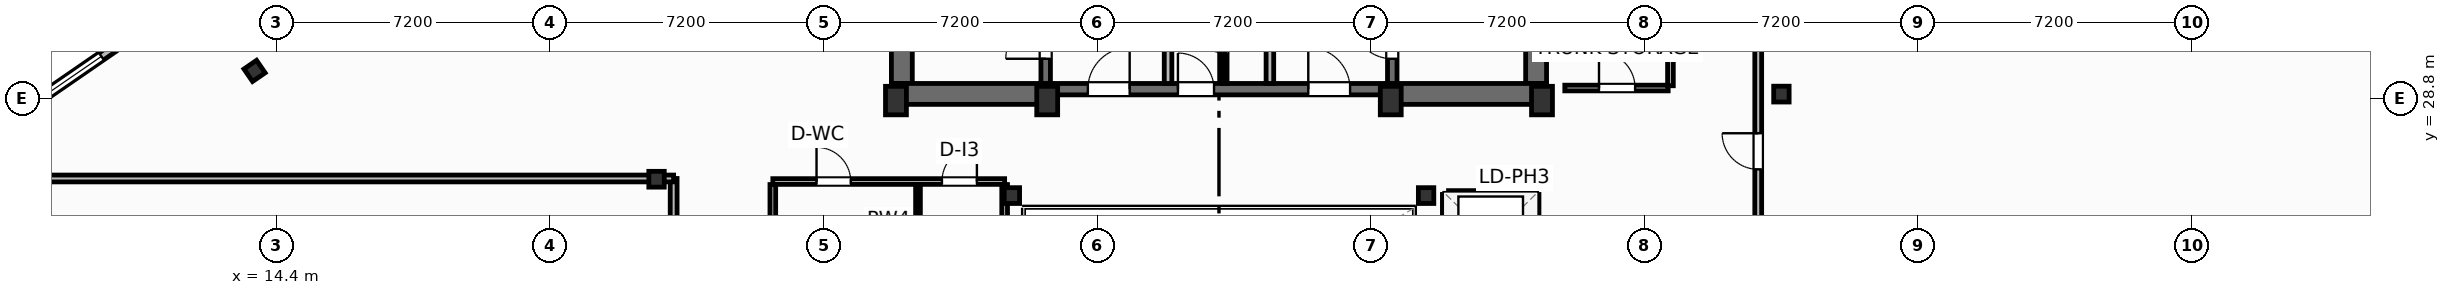
"""IFC4 building model, lengths in metres.
Left out: names, types, materials, properties, quantities, classifications, styles, units other than length and angle.
Written with IfcOpenShell. Run it as: python <this file> out.ifc"""

import sys

from ifc_helpers import new_model, si_unit, direction, frame, frame_2d, origin, origin_2d, place, context, subcontext, project, spatial, rectangle, i_section, extrude, element, fill, save


model = new_model("IFC4")
c1 = context("Model", 3, precision=1e-05, world=origin(), true_north=direction((0.0, 1.0)))
c2 = subcontext(c1, "Body", "Model", "MODEL_VIEW")
j1 = project(units=[si_unit("LENGTHUNIT", "METRE"), si_unit("PLANEANGLEUNIT", "RADIAN")], contexts=[c1])
p1 = place(None, origin())
s1 = spatial("IfcSite", under=j1, at=p1, CompositionType="ELEMENT")
p2 = place(p1, origin())
s2 = spatial("IfcBuilding", under=s1, at=p2, CompositionType="ELEMENT")
p3 = place(p2, frame((0.0, 0.0, 280.4)))
s3 = spatial("IfcBuildingStorey", under=s2, at=p3, CompositionType="ELEMENT", Elevation=280.4)
for number, where, z_axis, x_axis in (
    (1, (30.7, 28.75, 0.0), (0.0, 0.0, 1.0), (1.0, 0.0, 0.0)),
    (2, (34.68, 28.75, 0.0), (0.0, 0.0, 1.0), (1.0, 0.0, 0.0)),
    (3, (43.72, 28.75, 0.0), (0.0, 0.0, 1.0), (1.0, 0.0, 0.0)),
    (4, (47.7, 28.75, 0.0), (0.0, 0.0, 1.0), (1.0, 0.0, 0.0)),
):
    element("IfcColumn", number, at=place(p3, frame(where, z_axis=z_axis, x_axis=x_axis)), inside=s3, PredefinedType="COLUMN", context=c2, shape_type="SweptSolid", body=[
        extrude(rectangle(XDim=0.55, YDim=0.75, at=origin_2d()), origin(), (0.0, 0.0, 1.0), 3.7),
    ])
for number, where, z_axis, x_axis in (
    (5, (33.75, 26.25, 0.0), (0.0, 0.0, 1.0), (1.0, 0.0, 0.0)),
    (6, (44.65, 26.25, 0.0), (0.0, 0.0, 1.0), (1.0, 0.0, 0.0)),
    (7, (24.4, 26.68, 0.0), (0.0, 0.0, 1.0), (1.0, 0.0, 0.0)),
    (8, (54.0, 28.92, 0.0), (0.0, 0.0, 1.0), (1.0, 0.0, 0.0)),
):
    element("IfcColumn", number, at=place(p3, frame(where, z_axis=z_axis, x_axis=x_axis)), inside=s3, PredefinedType="COLUMN", context=c2, shape_type="SweptSolid", body=[
        extrude(i_section(OverallWidth=0.406, OverallDepth=0.416, WebThickness=0.03, FlangeThickness=0.048, FilletRadius=0.025, at=origin_2d()), origin(), (0.0, 0.0, 1.0), 3.7),
    ])
for number, where, z_axis, x_axis in (
    (9, (30.855, 29.2, 0.0), (0.0, 0.0, 1.0), (0.0, 1.0, 0.0)),
    (10, (47.545, 29.2, 0.0), (0.0, 0.0, 1.0), (0.0, 1.0, 0.0)),
):
    element("IfcWall", number, at=place(p3, frame(where, z_axis=z_axis, x_axis=x_axis)), inside=s3, PredefinedType="SHEAR", context=c2, shape_type="SweptSolid", body=[
        extrude(rectangle(XDim=9.22, YDim=0.55, at=frame_2d((4.61, 0.0))), origin(), (0.0, 0.0, 1.0), 3.45),
    ])
for number, where, z_axis, x_axis in (
    (11, (30.58, 28.925, 0.0), (0.0, 0.0, 1.0), (1.0, 0.0, 0.0)),
    (12, (43.6, 28.925, 0.0), (0.0, 0.0, 1.0), (1.0, 0.0, 0.0)),
):
    element("IfcWall", number, at=place(p3, frame(where, z_axis=z_axis, x_axis=x_axis)), inside=s3, PredefinedType="SHEAR", context=c2, shape_type="SweptSolid", body=[
        extrude(rectangle(XDim=4.22, YDim=0.55, at=frame_2d((2.11, 0.0))), origin(), (0.0, 0.0, 1.0), 3.45),
    ])
p4 = place(p3, frame((34.8, 29.05, 0.0), z_axis=(0.0, 0.0, 1.0), x_axis=(1.0, 0.0, 0.0)))
e13 = element("IfcWall", 13, at=p4, inside=s3, PredefinedType="SHEAR", context=c2, shape_type="SweptSolid", body=[
    extrude(rectangle(XDim=8.8, YDim=0.3, at=frame_2d((4.4, 0.0))), origin(), (0.0, 0.0, 1.0), 3.45),
])
p5 = place(p4, frame((0.95, 0.0, 0.0)))
e14 = element("IfcOpeningElement", 14, at=p5, cuts=e13, PredefinedType="OPENING", context=c2, shape_type="SweptSolid", body=[
    extrude(rectangle(XDim=1.1, YDim=2.15, at=frame_2d((0.55, 1.075))), frame((0.0, 0.16, 0.0), z_axis=(0.0, -1.0, 0.0), x_axis=(1.0, 0.0, 0.0)), (0.0, 0.0, 1.0), 0.32),
])
p6 = place(p4, frame((6.75, 0.0, 0.0)))
e15 = element("IfcOpeningElement", 15, at=p6, cuts=e13, PredefinedType="OPENING", context=c2, shape_type="SweptSolid", body=[
    extrude(rectangle(XDim=1.1, YDim=2.15, at=frame_2d((0.55, 1.075))), frame((0.0, 0.16, 0.0), z_axis=(0.0, -1.0, 0.0), x_axis=(1.0, 0.0, 0.0)), (0.0, 0.0, 1.0), 0.32),
])
p7 = place(p4, frame((3.32, 0.0, 0.0)))
e16 = element("IfcOpeningElement", 16, at=p7, cuts=e13, PredefinedType="OPENING", context=c2, shape_type="SweptSolid", body=[
    extrude(rectangle(XDim=0.95, YDim=2.15, at=frame_2d((0.475, 1.075))), frame((0.0, 0.16, 0.0), z_axis=(0.0, -1.0, 0.0), x_axis=(1.0, 0.0, 0.0)), (0.0, 0.0, 1.0), 0.32),
])
p8 = place(p3, frame((34.64, 29.2, 0.0), z_axis=(0.0, 0.0, 1.0), x_axis=(0.0, 1.0, 0.0)))
e17 = element("IfcWall", 17, at=p8, inside=s3, PredefinedType="SHEAR", context=c2, shape_type="SweptSolid", body=[
    extrude(rectangle(XDim=9.22, YDim=0.25, at=frame_2d((4.61, 0.0))), origin(), (0.0, 0.0, 1.0), 3.45),
])
p9 = place(p8, frame((0.65, 0.0, 0.0)))
e18 = element("IfcOpeningElement", 18, at=p9, cuts=e17, PredefinedType="OPENING", context=c2, shape_type="SweptSolid", body=[
    extrude(rectangle(XDim=1.05, YDim=2.15, at=frame_2d((0.525, 1.075))), frame((0.0, 0.135, 0.0), z_axis=(0.0, -1.0, 0.0), x_axis=(1.0, 0.0, 0.0)), (0.0, 0.0, 1.0), 0.27),
])
p10 = place(p3, frame((43.76, 29.2, 0.0), z_axis=(0.0, 0.0, 1.0), x_axis=(0.0, 1.0, 0.0)))
e19 = element("IfcWall", 19, at=p10, inside=s3, PredefinedType="SHEAR", context=c2, shape_type="SweptSolid", body=[
    extrude(rectangle(XDim=9.22, YDim=0.25, at=frame_2d((4.61, 0.0))), origin(), (0.0, 0.0, 1.0), 3.45),
])
p11 = place(p10, frame((0.65, 0.0, 0.0)))
e20 = element("IfcOpeningElement", 20, at=p11, cuts=e19, PredefinedType="OPENING", context=c2, shape_type="SweptSolid", body=[
    extrude(rectangle(XDim=1.05, YDim=2.15, at=frame_2d((0.525, 1.075))), frame((0.0, 0.135, 0.0), z_axis=(0.0, -1.0, 0.0), x_axis=(1.0, 0.0, 0.0)), (0.0, 0.0, 1.0), 0.27),
])
p12 = place(p3, frame((13.822, 29.53, 0.0), z_axis=(0.0, 0.0, 1.0), x_axis=(0.823532597628, 0.567268949127, 0.0)))
e21 = element("IfcColumn", 21, at=p12, inside=s3, PredefinedType="COLUMN", context=c2, shape_type="SweptSolid", body=[
    extrude(i_section(OverallWidth=0.401, OverallDepth=0.399, WebThickness=0.025, FlangeThickness=0.04, FilletRadius=0.022, at=origin_2d()), origin(), (0.0, 0.0, 1.0), 3.7),
])
p13 = place(p3, frame((13.408, 32.402, 0.0), z_axis=(0.0, 0.0, 1.0), x_axis=(-0.823527634633, -0.567276154087, 0.0)))
e22 = element("IfcWall", 22, at=p13, inside=s3, PredefinedType="SOLIDWALL", context=c2, shape_type="SweptSolid", body=[
    extrude(rectangle(XDim=10.88, YDim=0.22, at=frame_2d((5.44, 0.0))), origin(), (0.0, 0.0, 1.0), 2.73),
])
p14 = place(p13, frame((4.39, 0.0, 0.8)))
e23 = element("IfcOpeningElement", 23, at=p14, cuts=e22, PredefinedType="OPENING", context=c2, shape_type="SweptSolid", body=[
    extrude(rectangle(XDim=2.1, YDim=1.75, at=frame_2d((1.05, 0.875))), frame((0.0, 0.12, 0.0), z_axis=(0.0, -1.0, 0.0), x_axis=(1.0, 0.0, 0.0)), (0.0, 0.0, 1.0), 0.24),
])
p15 = place(p3, frame((24.85, 19.2, 0.0), z_axis=(0.0, 0.0, 1.0), x_axis=(0.0, 1.0, 0.0)))
e24 = element("IfcWall", 24, at=p15, inside=s3, PredefinedType="PARTITIONING", context=c2, shape_type="SweptSolid", body=[
    extrude(rectangle(XDim=7.5, YDim=0.18, at=frame_2d((3.75, 0.0))), origin(), (0.0, 0.0, 1.0), 3.45),
])
p16 = place(p15, frame((3.275, 0.0, 0.0)))
e25 = element("IfcOpeningElement", 25, at=p16, cuts=e24, PredefinedType="OPENING", context=c2, shape_type="SweptSolid", body=[
    extrude(rectangle(XDim=0.95, YDim=2.05, at=frame_2d((0.475, 1.025))), frame((0.0, 0.1, 0.0), z_axis=(0.0, -1.0, 0.0), x_axis=(1.0, 0.0, 0.0)), (0.0, 0.0, 1.0), 0.2),
])
p17 = place(p3, frame((5.165, 26.7, 0.0), z_axis=(0.0, 0.0, 1.0), x_axis=(1.0, 0.0, 0.0)))
e26 = element("IfcWall", 26, at=p17, inside=s3, PredefinedType="PARTITIONING", context=c2, shape_type="SweptSolid", body=[
    extrude(rectangle(XDim=19.685, YDim=0.18, at=frame_2d((9.843, 0.0))), origin(), (0.0, 0.0, 1.0), 2.662),
])
p18 = place(p3, frame((53.39, 19.24, 0.0), z_axis=(0.0, 0.0, 1.0), x_axis=(0.0, 1.0, 0.0)))
e27 = element("IfcWall", 27, at=p18, inside=s3, PredefinedType="PARTITIONING", context=c2, shape_type="SweptSolid", body=[
    extrude(rectangle(XDim=20.06, YDim=0.18, at=frame_2d((10.03, 0.0))), origin(), (0.0, 0.0, 1.0), 3.45),
])
p19 = place(p18, frame((7.7, 0.0, 0.0)))
e28 = element("IfcOpeningElement", 28, at=p19, cuts=e27, PredefinedType="OPENING", context=c2, shape_type="SweptSolid", body=[
    extrude(rectangle(XDim=0.95, YDim=2.05, at=frame_2d((0.475, 1.025))), frame((0.0, 0.1, 0.0), z_axis=(0.0, -1.0, 0.0), x_axis=(1.0, 0.0, 0.0)), (0.0, 0.0, 1.0), 0.2),
])
for number, where, z_axis, x_axis in (
    (29, (37.86, 29.2, 0.0), (0.0, 0.0, 1.0), (0.0, 1.0, 0.0)),
    (30, (40.54, 29.2, 0.0), (0.0, 0.0, 1.0), (0.0, 1.0, 0.0)),
):
    element("IfcWall", number, at=place(p3, frame(where, z_axis=z_axis, x_axis=x_axis)), inside=s3, PredefinedType="PARTITIONING", context=c2, shape_type="SweptSolid", body=[
        extrude(rectangle(XDim=5.18, YDim=0.2, at=frame_2d((2.59, 0.0))), origin(), (0.0, 0.0, 1.0), 3.45),
    ])
p20 = place(p3, frame((39.35, 29.2, 0.0), z_axis=(0.0, 0.0, 1.0), x_axis=(0.0, 1.0, 0.0)))
e31 = element("IfcWall", 31, at=p20, inside=s3, PredefinedType="PARTITIONING", context=c2, shape_type="SweptSolid", body=[
    extrude(rectangle(XDim=5.22, YDim=0.125, at=frame_2d((2.61, 0.0))), origin(), (0.0, 0.0, 1.0), 3.45),
])
p21 = place(p20, frame((0.8, 0.0, 0.0)))
e32 = element("IfcOpeningElement", 32, at=p21, cuts=e31, PredefinedType="OPENING", context=c2, shape_type="SweptSolid", body=[
    extrude(rectangle(XDim=0.85, YDim=2.05, at=frame_2d((0.425, 1.025))), frame((0.0, 0.073, 0.0), z_axis=(0.0, -1.0, 0.0), x_axis=(1.0, 0.0, 0.0)), (0.0, 0.0, 1.0), 0.145),
])
p22 = place(p20, frame((3.4, 0.0, 0.0)))
e33 = element("IfcOpeningElement", 33, at=p22, cuts=e31, PredefinedType="OPENING", context=c2, shape_type="SweptSolid", body=[
    extrude(rectangle(XDim=0.85, YDim=2.05, at=frame_2d((0.425, 1.025))), frame((0.0, 0.073, 0.0), z_axis=(0.0, -1.0, 0.0), x_axis=(1.0, 0.0, 0.0)), (0.0, 0.0, 1.0), 0.145),
])
p23 = place(p3, frame((27.46, 26.62, 0.0), z_axis=(0.0, 0.0, 1.0), x_axis=(1.0, 0.0, 0.0)))
e34 = element("IfcWall", 34, at=p23, inside=s3, PredefinedType="PARTITIONING", context=c2, shape_type="SweptSolid", body=[
    extrude(rectangle(XDim=6.1, YDim=0.15, at=frame_2d((3.05, 0.0))), origin(), (0.0, 0.0, 1.0), 2.662),
])
p24 = place(p23, frame((1.15, 0.0, 0.0)))
e35 = element("IfcOpeningElement", 35, at=p24, cuts=e34, PredefinedType="OPENING", context=c2, shape_type="SweptSolid", body=[
    extrude(rectangle(XDim=0.9, YDim=2.05, at=frame_2d((0.45, 1.025))), frame((0.0, 0.085, 0.0), z_axis=(0.0, -1.0, 0.0), x_axis=(1.0, 0.0, 0.0)), (0.0, 0.0, 1.0), 0.17),
])
p25 = place(p23, frame((4.45, 0.0, 0.0)))
e36 = element("IfcOpeningElement", 36, at=p25, cuts=e34, PredefinedType="OPENING", context=c2, shape_type="SweptSolid", body=[
    extrude(rectangle(XDim=0.92, YDim=2.05, at=frame_2d((0.46, 1.025))), frame((0.0, 0.085, 0.0), z_axis=(0.0, -1.0, 0.0), x_axis=(1.0, 0.0, 0.0)), (0.0, 0.0, 1.0), 0.17),
])
p26 = place(p3, frame((31.28, 19.38, 0.0), z_axis=(0.0, 0.0, 1.0), x_axis=(0.0, 1.0, 0.0)))
e37 = element("IfcWall", 37, at=p26, inside=s3, PredefinedType="PARTITIONING", context=c2, shape_type="SweptSolid", body=[
    extrude(rectangle(XDim=7.16, YDim=0.125, at=frame_2d((3.58, 0.0))), origin(), (0.0, 0.0, 1.0), 3.45),
])
p27 = place(p3, frame((27.46, 19.38, 0.0), z_axis=(0.0, 0.0, 1.0), x_axis=(0.0, 1.0, 0.0)))
e38 = element("IfcWall", 38, at=p27, inside=s3, PredefinedType="PARTITIONING", context=c2, shape_type="SweptSolid", body=[
    extrude(rectangle(XDim=7.16, YDim=0.15, at=frame_2d((3.58, 0.0))), origin(), (0.0, 0.0, 1.0), 3.45),
])
p28 = place(p27, frame((1.4, 0.0, 0.0)))
e39 = element("IfcOpeningElement", 39, at=p28, cuts=e38, PredefinedType="OPENING", context=c2, shape_type="SweptSolid", body=[
    extrude(rectangle(XDim=0.95, YDim=2.05, at=frame_2d((0.475, 1.025))), frame((0.0, 0.085, 0.0), z_axis=(0.0, -1.0, 0.0), x_axis=(1.0, 0.0, 0.0)), (0.0, 0.0, 1.0), 0.17),
])
p29 = place(p3, frame((33.56, 19.38, 0.0), z_axis=(0.0, 0.0, 1.0), x_axis=(0.0, 1.0, 0.0)))
e40 = element("IfcWall", 40, at=p29, inside=s3, PredefinedType="PARTITIONING", context=c2, shape_type="SweptSolid", body=[
    extrude(rectangle(XDim=7.16, YDim=0.15, at=frame_2d((3.58, 0.0))), origin(), (0.0, 0.0, 1.0), 2.824),
])
p30 = place(p3, frame((48.3, 29.08, 0.0), z_axis=(0.0, 0.0, 1.0), x_axis=(1.0, 0.0, 0.0)))
e41 = element("IfcWall", 41, at=p30, inside=s3, PredefinedType="PARTITIONING", context=c2, shape_type="SweptSolid", body=[
    extrude(rectangle(XDim=2.72, YDim=0.15, at=frame_2d((1.36, 0.0))), origin(), (0.0, 0.0, 1.0), 2.662),
])
p31 = place(p30, frame((0.9, 0.0, 0.0)))
e42 = element("IfcOpeningElement", 42, at=p31, cuts=e41, PredefinedType="OPENING", context=c2, shape_type="SweptSolid", body=[
    extrude(rectangle(XDim=0.95, YDim=2.05, at=frame_2d((0.475, 1.025))), frame((0.0, 0.085, 0.0), z_axis=(0.0, -1.0, 0.0), x_axis=(1.0, 0.0, 0.0)), (0.0, 0.0, 1.0), 0.17),
])
p32 = place(p3, frame((51.08, 29.14, 0.0), z_axis=(0.0, 0.0, 1.0), x_axis=(0.0, 1.0, 0.0)))
e43 = element("IfcWall", 43, at=p32, inside=s3, PredefinedType="PARTITIONING", context=c2, shape_type="SweptSolid", body=[
    extrude(rectangle(XDim=4.69, YDim=0.15, at=frame_2d((2.345, 0.0))), origin(), (0.0, 0.0, 1.0), 3.45),
])
p33 = place(p3, frame((45.24, 26.28, 0.0), z_axis=(0.0, 0.0, 1.0), x_axis=(1.0, 0.0, 0.0)))
e44 = element("IfcWall", 44, at=p33, inside=s3, PredefinedType="PARTITIONING", context=c2, shape_type="SweptSolid", body=[
    extrude(rectangle(XDim=2.22, YDim=0.2, at=frame_2d((1.11, 0.0))), origin(), (0.0, 0.0, 1.0), 3.45),
])
p34 = place(p3, frame((45.18, 19.38, 0.0), z_axis=(0.0, 0.0, 1.0), x_axis=(0.0, 1.0, 0.0)))
e45 = element("IfcWall", 45, at=p34, inside=s3, PredefinedType="PARTITIONING", context=c2, shape_type="SweptSolid", body=[
    extrude(rectangle(XDim=6.9, YDim=0.2, at=frame_2d((3.45, 0.0))), origin(), (0.0, 0.0, 1.0), 3.45),
])
p35 = place(p3, frame((47.52, 19.38, 0.0), z_axis=(0.0, 0.0, 1.0), x_axis=(0.0, 1.0, 0.0)))
e46 = element("IfcWall", 46, at=p35, inside=s3, PredefinedType="PARTITIONING", context=c2, shape_type="SweptSolid", body=[
    extrude(rectangle(XDim=6.9, YDim=0.2, at=frame_2d((3.45, 0.0))), origin(), (0.0, 0.0, 1.0), 3.45),
])
p36 = place(p35, frame((0.59, 0.0, 0.0)))
e47 = element("IfcOpeningElement", 47, at=p36, cuts=e46, PredefinedType="OPENING", context=c2, shape_type="SweptSolid", body=[
    extrude(rectangle(XDim=1.1, YDim=2.15, at=frame_2d((0.55, 1.075))), frame((0.0, 0.11, 0.0), z_axis=(0.0, -1.0, 0.0), x_axis=(1.0, 0.0, 0.0)), (0.0, 0.0, 1.0), 0.22),
])
p37 = place(p35, frame((2.89, 0.0, 0.0)))
e48 = element("IfcOpeningElement", 48, at=p37, cuts=e46, PredefinedType="OPENING", context=c2, shape_type="SweptSolid", body=[
    extrude(rectangle(XDim=1.1, YDim=2.15, at=frame_2d((0.55, 1.075))), frame((0.0, 0.11, 0.0), z_axis=(0.0, -1.0, 0.0), x_axis=(1.0, 0.0, 0.0)), (0.0, 0.0, 1.0), 0.22),
])
p38 = place(p35, frame((5.19, 0.0, 0.0)))
e49 = element("IfcOpeningElement", 49, at=p38, cuts=e46, PredefinedType="OPENING", context=c2, shape_type="SweptSolid", body=[
    extrude(rectangle(XDim=1.1, YDim=2.15, at=frame_2d((0.55, 1.075))), frame((0.0, 0.11, 0.0), z_axis=(0.0, -1.0, 0.0), x_axis=(1.0, 0.0, 0.0)), (0.0, 0.0, 1.0), 0.22),
])
p39 = place(p14, origin())
e50 = element("IfcWindow", 50, at=p39, inside=s3, PartitioningType="SINGLE_PANEL", PredefinedType="WINDOW", context=c2, shape_type="SweptSolid", body=[
    extrude(rectangle(XDim=2.1, YDim=1.75, at=frame_2d((1.05, 0.875))), frame((0.0, 0.03, 0.0), z_axis=(0.0, -1.0, 0.0), x_axis=(1.0, 0.0, 0.0)), (0.0, 0.0, 1.0), 0.06),
])
fill(e23, e50)
p40 = place(p19, origin())
e51 = element("IfcDoor", 51, at=p40, inside=s3, OperationType="SINGLE_SWING_RIGHT", PredefinedType="DOOR", context=c2, shape_type="SweptSolid", body=[
    extrude(rectangle(XDim=0.95, YDim=2.05, at=frame_2d((0.475, 1.025))), frame((0.0, 0.025, 0.0), z_axis=(0.0, -1.0, 0.0), x_axis=(1.0, 0.0, 0.0)), (0.0, 0.0, 1.0), 0.05),
])
fill(e28, e51)
p41 = place(p9, origin())
e52 = element("IfcDoor", 52, at=p41, inside=s3, OperationType="SINGLE_SWING_LEFT", PredefinedType="DOOR", context=c2, shape_type="SweptSolid", body=[
    extrude(rectangle(XDim=1.05, YDim=2.15, at=frame_2d((0.525, 1.075))), frame((0.0, 0.025, 0.0), z_axis=(0.0, -1.0, 0.0), x_axis=(1.0, 0.0, 0.0)), (0.0, 0.0, 1.0), 0.05),
])
fill(e18, e52)
p42 = place(p11, origin())
e53 = element("IfcDoor", 53, at=p42, inside=s3, OperationType="SINGLE_SWING_RIGHT", PredefinedType="DOOR", context=c2, shape_type="SweptSolid", body=[
    extrude(rectangle(XDim=1.05, YDim=2.15, at=frame_2d((0.525, 1.075))), frame((0.0, 0.025, 0.0), z_axis=(0.0, -1.0, 0.0), x_axis=(1.0, 0.0, 0.0)), (0.0, 0.0, 1.0), 0.05),
])
fill(e20, e53)
p43 = place(p5, origin())
e54 = element("IfcDoor", 54, at=p43, inside=s3, OperationType="SINGLE_SWING_RIGHT", PredefinedType="DOOR", context=c2, shape_type="SweptSolid", body=[
    extrude(rectangle(XDim=1.1, YDim=2.15, at=frame_2d((0.55, 1.075))), frame((0.0, 0.025, 0.0), z_axis=(0.0, -1.0, 0.0), x_axis=(1.0, 0.0, 0.0)), (0.0, 0.0, 1.0), 0.05),
])
fill(e14, e54)
p44 = place(p6, origin())
e55 = element("IfcDoor", 55, at=p44, inside=s3, OperationType="SINGLE_SWING_LEFT", PredefinedType="DOOR", context=c2, shape_type="SweptSolid", body=[
    extrude(rectangle(XDim=1.1, YDim=2.15, at=frame_2d((0.55, 1.075))), frame((0.0, 0.025, 0.0), z_axis=(0.0, -1.0, 0.0), x_axis=(1.0, 0.0, 0.0)), (0.0, 0.0, 1.0), 0.05),
])
fill(e15, e55)
p45 = place(p21, origin())
e56 = element("IfcDoor", 56, at=p45, inside=s3, OperationType="SINGLE_SWING_RIGHT", PredefinedType="DOOR", context=c2, shape_type="SweptSolid", body=[
    extrude(rectangle(XDim=0.85, YDim=2.05, at=frame_2d((0.425, 1.025))), frame((0.0, 0.025, 0.0), z_axis=(0.0, -1.0, 0.0), x_axis=(1.0, 0.0, 0.0)), (0.0, 0.0, 1.0), 0.05),
])
fill(e32, e56)
p46 = place(p7, origin())
e57 = element("IfcDoor", 57, at=p46, inside=s3, OperationType="SINGLE_SWING_LEFT", PredefinedType="DOOR", context=c2, shape_type="SweptSolid", body=[
    extrude(rectangle(XDim=0.95, YDim=2.15, at=frame_2d((0.475, 1.075))), frame((0.0, 0.025, 0.0), z_axis=(0.0, -1.0, 0.0), x_axis=(1.0, 0.0, 0.0)), (0.0, 0.0, 1.0), 0.05),
])
fill(e16, e57)
p47 = place(p24, origin())
e58 = element("IfcDoor", 58, at=p47, inside=s3, OperationType="SINGLE_SWING_LEFT", PredefinedType="DOOR", context=c2, shape_type="SweptSolid", body=[
    extrude(rectangle(XDim=0.9, YDim=2.05, at=frame_2d((0.45, 1.025))), frame((0.0, 0.025, 0.0), z_axis=(0.0, -1.0, 0.0), x_axis=(1.0, 0.0, 0.0)), (0.0, 0.0, 1.0), 0.05),
])
fill(e35, e58)
p48 = place(p25, origin())
e59 = element("IfcDoor", 59, at=p48, inside=s3, OperationType="SINGLE_SWING_RIGHT", PredefinedType="DOOR", context=c2, shape_type="SweptSolid", body=[
    extrude(rectangle(XDim=0.92, YDim=2.05, at=frame_2d((0.46, 1.025))), frame((0.0, 0.025, 0.0), z_axis=(0.0, -1.0, 0.0), x_axis=(1.0, 0.0, 0.0)), (0.0, 0.0, 1.0), 0.05),
])
fill(e36, e59)
p49 = place(p31, origin())
e60 = element("IfcDoor", 60, at=p49, inside=s3, OperationType="SINGLE_SWING_LEFT", PredefinedType="DOOR", context=c2, shape_type="SweptSolid", body=[
    extrude(rectangle(XDim=0.95, YDim=2.05, at=frame_2d((0.475, 1.025))), frame((0.0, 0.025, 0.0), z_axis=(0.0, -1.0, 0.0), x_axis=(1.0, 0.0, 0.0)), (0.0, 0.0, 1.0), 0.05),
])
fill(e42, e60)
save(model, sys.argv[1])
